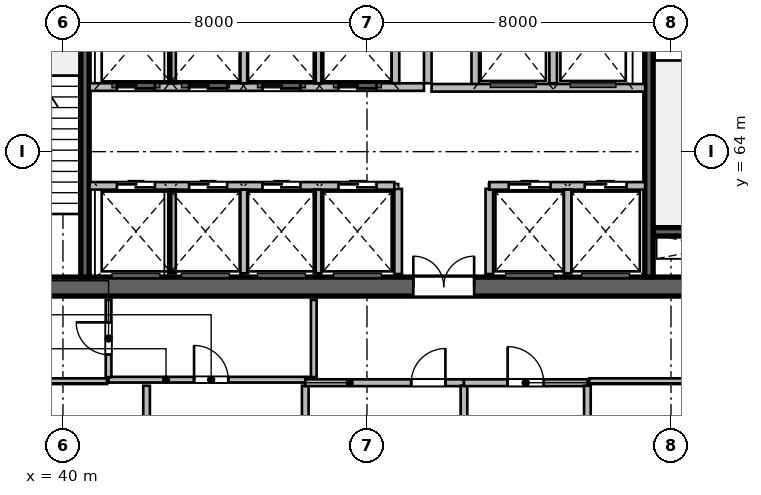
"""IFC4 building model, lengths in metres.
Left out: names, types, materials, properties, quantities, classifications, styles, units other than length and angle.
Written with IfcOpenShell. Run it as: python <this file> out.ifc"""

import sys

from ifc_helpers import new_model, si_unit, direction, frame, frame_2d, origin, place, context, subcontext, project, spatial, rectangle, extrude, source, transform, mapped, element, fill, save


model = new_model("IFC4")
c1 = context("Model", 3, precision=1e-05, world=origin(), true_north=direction((0.0, 1.0)))
c2 = subcontext(c1, "Body", "Model", "MODEL_VIEW")
j1 = project(units=[si_unit("LENGTHUNIT", "METRE"), si_unit("PLANEANGLEUNIT", "RADIAN")], contexts=[c1])
p1 = place(None, origin())
s1 = spatial("IfcSite", under=j1, at=p1, CompositionType="ELEMENT")
p2 = place(p1, origin())
s2 = spatial("IfcBuilding", under=s1, at=p2, CompositionType="ELEMENT")
p3 = place(p2, frame((0.0, 0.0, 91.2)))
s3 = spatial("IfcBuildingStorey", under=s2, at=p3, CompositionType="ELEMENT", Elevation=91.2)
m1 = source(origin(), c2, "Body", "SweptSolid", [
    extrude(rectangle(XDim=21.6, YDim=0.5, at=frame_2d((10.8, 0.0))), origin(), (0.0, 0.0, 1.0), 4.8),
])
p4 = place(p3, frame((37.2, 60.45, 0.0), z_axis=(0.0, 0.0, 1.0), x_axis=(1.0, 0.0, 0.0)))
e1 = element("IfcWall", 1, at=p4, inside=s3, PredefinedType="SHEAR", context=c2, shape_type="MappedRepresentation", body=[
    mapped(m1, transform((0.0, 0.0, 0.0), scale=1.0)),
])
p5 = place(p4, frame((1.1, 0.0, 0.0)))
e2 = element("IfcOpeningElement", 2, at=p5, cuts=e1, PredefinedType="OPENING", context=c2, shape_type="SweptSolid", body=[
    extrude(rectangle(XDim=1.15, YDim=2.15, at=frame_2d((0.575, 1.075))), frame((0.0, 0.26, 0.0), z_axis=(0.0, -1.0, 0.0), x_axis=(1.0, 0.0, 0.0)), (0.0, 0.0, 1.0), 0.52),
])
p6 = place(p4, frame((19.5, 0.0, 0.0)))
e3 = element("IfcOpeningElement", 3, at=p6, cuts=e1, PredefinedType="OPENING", context=c2, shape_type="SweptSolid", body=[
    extrude(rectangle(XDim=0.9, YDim=2.1, at=frame_2d((0.45, 1.05))), frame((0.0, 0.26, 0.0), z_axis=(0.0, -1.0, 0.0), x_axis=(1.0, 0.0, 0.0)), (0.0, 0.0, 1.0), 0.52),
])
p7 = place(p4, frame((12.02, 0.0, 0.0)))
e4 = element("IfcOpeningElement", 4, at=p7, cuts=e1, PredefinedType="OPENING", context=c2, shape_type="SweptSolid", body=[
    extrude(rectangle(XDim=1.6, YDim=2.15, at=frame_2d((0.8, 1.075))), frame((0.0, 0.26, 0.0), z_axis=(0.0, -1.0, 0.0), x_axis=(1.0, 0.0, 0.0)), (0.0, 0.0, 1.0), 0.52),
])
m2 = source(origin(), c2, "Body", "SweptSolid", [
    extrude(rectangle(XDim=3.27, YDim=0.22, at=frame_2d((1.635, 0.0))), origin(), (0.0, 0.0, 1.0), 4.8),
])
p8 = place(p3, frame((55.53, 61.89, 0.0), z_axis=(0.0, 0.0, 1.0), x_axis=(1.0, 0.0, 0.0)))
e5 = element("IfcWall", 5, at=p8, inside=s3, PredefinedType="SHEAR", context=c2, shape_type="MappedRepresentation", body=[
    mapped(m2, transform((0.0, 0.0, 0.0), scale=1.0)),
])
m3 = source(origin(), c2, "Body", "SweptSolid", [
    extrude(rectangle(XDim=11.0, YDim=0.22, at=frame_2d((5.5, 0.0))), origin(), (0.0, 0.0, 1.0), 4.8),
])
p9 = place(p3, frame((40.58, 60.7, 0.0), z_axis=(0.0, 0.0, 1.0), x_axis=(0.0, 1.0, 0.0)))
e6 = element("IfcWall", 6, at=p9, inside=s3, PredefinedType="SHEAR", context=c2, shape_type="MappedRepresentation", body=[
    mapped(m3, transform((0.0, 0.0, 0.0), scale=1.0)),
])
p10 = place(p3, frame((55.42, 60.7, 0.0), z_axis=(0.0, 0.0, 1.0), x_axis=(0.0, 1.0, 0.0)))
e7 = element("IfcWall", 7, at=p10, inside=s3, PredefinedType="SHEAR", context=c2, shape_type="MappedRepresentation", body=[
    mapped(m3, transform((0.0, 0.0, 0.0), scale=1.0)),
])
p11 = place(p10, frame((9.545, 0.0, 0.0)))
e8 = element("IfcOpeningElement", 8, at=p11, cuts=e7, PredefinedType="OPENING", context=c2, shape_type="SweptSolid", body=[
    extrude(rectangle(XDim=1.15, YDim=2.15, at=frame_2d((0.575, 1.075))), frame((0.0, 0.12, 0.0), z_axis=(0.0, -1.0, 0.0), x_axis=(1.0, 0.0, 0.0)), (0.0, 0.0, 1.0), 0.24),
])
m4 = source(origin(), c2, "Body", "SweptSolid", [
    extrude(rectangle(XDim=2.24, YDim=0.2, at=frame_2d((1.12, 0.0))), origin(), (0.0, 0.0, 1.0), 4.55),
])
for number, where, z_axis, x_axis in (
    (9, (48.82, 60.78, 0.0), (0.0, 0.0, 1.0), (0.0, 1.0, 0.0)),
    (10, (51.22, 60.78, 0.0), (0.0, 0.0, 1.0), (0.0, 1.0, 0.0)),
):
    element("IfcWall", number, at=place(p3, frame(where, z_axis=z_axis, x_axis=x_axis)), inside=s3, PredefinedType="SOLIDWALL", context=c2, shape_type="MappedRepresentation", body=[
        mapped(m4, transform((0.0, 0.0, 0.0), scale=1.0)),
    ])
m5 = source(origin(), c2, "Body", "SweptSolid", [
    extrude(rectangle(XDim=5.8, YDim=0.2, at=frame_2d((2.9, 0.0))), origin(), (0.0, 0.0, 1.0), 4.55),
])
p12 = place(p3, frame((49.6, 65.8, 0.0), z_axis=(0.0, 0.0, 1.0), x_axis=(0.0, 1.0, 0.0)))
e11 = element("IfcWall", 11, at=p12, inside=s3, PredefinedType="SOLIDWALL", context=c2, shape_type="MappedRepresentation", body=[
    mapped(m5, transform((0.0, 0.0, 0.0), scale=1.0)),
])
m6 = source(origin(), c2, "Body", "SweptSolid", [
    extrude(rectangle(XDim=2.58, YDim=0.2, at=frame_2d((1.29, 0.0))), origin(), (0.0, 0.0, 1.0), 4.55),
])
p13 = place(p3, frame((50.85, 65.68, 0.0), z_axis=(0.0, 0.0, 1.0), x_axis=(0.0, 1.0, 0.0)))
e12 = element("IfcWall", 12, at=p13, inside=s3, PredefinedType="SOLIDWALL", context=c2, shape_type="MappedRepresentation", body=[
    mapped(m6, transform((0.0, 0.0, 0.0), scale=1.0)),
])
m7 = source(origin(), c2, "Body", "SweptSolid", [
    extrude(rectangle(XDim=2.4, YDim=0.2, at=frame_2d((1.2, 0.0))), origin(), (0.0, 0.0, 1.0), 4.55),
])
p14 = place(p3, frame((52.9, 65.8, 0.0), z_axis=(0.0, 0.0, 1.0), x_axis=(0.0, 1.0, 0.0)))
e13 = element("IfcWall", 13, at=p14, inside=s3, PredefinedType="SOLIDWALL", context=c2, shape_type="MappedRepresentation", body=[
    mapped(m7, transform((0.0, 0.0, 0.0), scale=1.0)),
])
m8 = source(origin(), c2, "Body", "SweptSolid", [
    extrude(rectangle(XDim=5.62, YDim=0.2, at=frame_2d((2.81, 0.0))), origin(), (0.0, 0.0, 1.0), 4.55),
])
p15 = place(p3, frame((49.7, 65.68, 0.0), z_axis=(0.0, 0.0, 1.0), x_axis=(1.0, 0.0, 0.0)))
e14 = element("IfcWall", 14, at=p15, inside=s3, PredefinedType="SOLIDWALL", context=c2, shape_type="MappedRepresentation", body=[
    mapped(m8, transform((0.0, 0.0, 0.0), scale=1.0)),
])
m9 = source(origin(), c2, "Body", "SweptSolid", [
    extrude(rectangle(XDim=8.02, YDim=0.2, at=frame_2d((4.01, 0.0))), origin(), (0.0, 0.0, 1.0), 4.55),
])
p16 = place(p3, frame((40.7, 63.1, 0.0), z_axis=(0.0, 0.0, 1.0), x_axis=(1.0, 0.0, 0.0)))
e15 = element("IfcWall", 15, at=p16, inside=s3, PredefinedType="SOLIDWALL", context=c2, shape_type="MappedRepresentation", body=[
    mapped(m9, transform((0.0, 0.0, 0.0), scale=1.0)),
])
p17 = place(p16, frame((0.72, 0.0, 0.0)))
e16 = element("IfcOpeningElement", 16, at=p17, cuts=e15, PredefinedType="OPENING", context=c2, shape_type="SweptSolid", body=[
    extrude(rectangle(XDim=1.0, YDim=2.15, at=frame_2d((0.5, 1.075))), frame((0.0, 0.11, 0.0), z_axis=(0.0, -1.0, 0.0), x_axis=(1.0, 0.0, 0.0)), (0.0, 0.0, 1.0), 0.22),
])
p18 = place(p16, frame((2.62, 0.0, 0.0)))
e17 = element("IfcOpeningElement", 17, at=p18, cuts=e15, PredefinedType="OPENING", context=c2, shape_type="SweptSolid", body=[
    extrude(rectangle(XDim=1.0, YDim=2.15, at=frame_2d((0.5, 1.075))), frame((0.0, 0.11, 0.0), z_axis=(0.0, -1.0, 0.0), x_axis=(1.0, 0.0, 0.0)), (0.0, 0.0, 1.0), 0.22),
])
p19 = place(p16, frame((4.55, 0.0, 0.0)))
e18 = element("IfcOpeningElement", 18, at=p19, cuts=e15, PredefinedType="OPENING", context=c2, shape_type="SweptSolid", body=[
    extrude(rectangle(XDim=1.0, YDim=2.15, at=frame_2d((0.5, 1.075))), frame((0.0, 0.11, 0.0), z_axis=(0.0, -1.0, 0.0), x_axis=(1.0, 0.0, 0.0)), (0.0, 0.0, 1.0), 0.22),
])
p20 = place(p16, frame((6.55, 0.0, 0.0)))
e19 = element("IfcOpeningElement", 19, at=p20, cuts=e15, PredefinedType="OPENING", context=c2, shape_type="SweptSolid", body=[
    extrude(rectangle(XDim=1.0, YDim=2.15, at=frame_2d((0.5, 1.075))), frame((0.0, 0.11, 0.0), z_axis=(0.0, -1.0, 0.0), x_axis=(1.0, 0.0, 0.0)), (0.0, 0.0, 1.0), 0.22),
])
m10 = source(origin(), c2, "Body", "SweptSolid", [
    extrude(rectangle(XDim=4.1, YDim=0.2, at=frame_2d((2.05, 0.0))), origin(), (0.0, 0.0, 1.0), 4.55),
])
p21 = place(p3, frame((51.22, 63.1, 0.0), z_axis=(0.0, 0.0, 1.0), x_axis=(1.0, 0.0, 0.0)))
e20 = element("IfcWall", 20, at=p21, inside=s3, PredefinedType="SOLIDWALL", context=c2, shape_type="MappedRepresentation", body=[
    mapped(m10, transform((0.0, 0.0, 0.0), scale=1.0)),
])
p22 = place(p21, frame((0.51, 0.0, 0.0)))
e21 = element("IfcOpeningElement", 21, at=p22, cuts=e20, PredefinedType="OPENING", context=c2, shape_type="SweptSolid", body=[
    extrude(rectangle(XDim=1.1, YDim=2.15, at=frame_2d((0.55, 1.075))), frame((0.0, 0.11, 0.0), z_axis=(0.0, -1.0, 0.0), x_axis=(1.0, 0.0, 0.0)), (0.0, 0.0, 1.0), 0.22),
])
p23 = place(p21, frame((2.51, 0.0, 0.0)))
e22 = element("IfcOpeningElement", 22, at=p23, cuts=e20, PredefinedType="OPENING", context=c2, shape_type="SweptSolid", body=[
    extrude(rectangle(XDim=1.1, YDim=2.15, at=frame_2d((0.55, 1.075))), frame((0.0, 0.11, 0.0), z_axis=(0.0, -1.0, 0.0), x_axis=(1.0, 0.0, 0.0)), (0.0, 0.0, 1.0), 0.22),
])
m11 = source(origin(), c2, "Body", "SweptSolid", [
    extrude(rectangle(XDim=2.2, YDim=0.2, at=frame_2d((1.1, 0.0))), origin(), (0.0, 0.0, 1.0), 4.55),
])
for number, where, z_axis, x_axis in (
    (23, (42.87, 60.8, 0.0), (0.0, 0.0, 1.0), (0.0, 1.0, 0.0)),
    (24, (44.77, 60.8, 0.0), (0.0, 0.0, 1.0), (0.0, 1.0, 0.0)),
    (25, (46.7, 60.8, 0.0), (0.0, 0.0, 1.0), (0.0, 1.0, 0.0)),
    (26, (53.28, 60.8, 0.0), (0.0, 0.0, 1.0), (0.0, 1.0, 0.0)),
):
    element("IfcWall", number, at=place(p3, frame(where, z_axis=z_axis, x_axis=x_axis)), inside=s3, PredefinedType="SOLIDWALL", context=c2, shape_type="MappedRepresentation", body=[
        mapped(m11, transform((0.0, 0.0, 0.0), scale=1.0)),
    ])
m12 = source(origin(), c2, "Body", "SweptSolid", [
    extrude(rectangle(XDim=8.8, YDim=0.2, at=frame_2d((4.4, 0.0))), origin(), (0.0, 0.0, 1.0), 4.55),
])
p24 = place(p3, frame((40.7, 65.7, 0.0), z_axis=(0.0, 0.0, 1.0), x_axis=(1.0, 0.0, 0.0)))
e27 = element("IfcWall", 27, at=p24, inside=s3, PredefinedType="SOLIDWALL", context=c2, shape_type="MappedRepresentation", body=[
    mapped(m12, transform((0.0, 0.0, 0.0), scale=1.0)),
])
p25 = place(p24, frame((0.72, 0.0, 0.0)))
e28 = element("IfcOpeningElement", 28, at=p25, cuts=e27, PredefinedType="OPENING", context=c2, shape_type="SweptSolid", body=[
    extrude(rectangle(XDim=1.0, YDim=2.15, at=frame_2d((0.5, 1.075))), frame((0.0, 0.11, 0.0), z_axis=(0.0, -1.0, 0.0), x_axis=(1.0, 0.0, 0.0)), (0.0, 0.0, 1.0), 0.22),
])
p26 = place(p24, frame((2.62, 0.0, 0.0)))
e29 = element("IfcOpeningElement", 29, at=p26, cuts=e27, PredefinedType="OPENING", context=c2, shape_type="SweptSolid", body=[
    extrude(rectangle(XDim=1.0, YDim=2.15, at=frame_2d((0.5, 1.075))), frame((0.0, 0.11, 0.0), z_axis=(0.0, -1.0, 0.0), x_axis=(1.0, 0.0, 0.0)), (0.0, 0.0, 1.0), 0.22),
])
p27 = place(p24, frame((4.55, 0.0, 0.0)))
e30 = element("IfcOpeningElement", 30, at=p27, cuts=e27, PredefinedType="OPENING", context=c2, shape_type="SweptSolid", body=[
    extrude(rectangle(XDim=1.0, YDim=2.15, at=frame_2d((0.5, 1.075))), frame((0.0, 0.11, 0.0), z_axis=(0.0, -1.0, 0.0), x_axis=(1.0, 0.0, 0.0)), (0.0, 0.0, 1.0), 0.22),
])
p28 = place(p24, frame((6.55, 0.0, 0.0)))
e31 = element("IfcOpeningElement", 31, at=p28, cuts=e27, PredefinedType="OPENING", context=c2, shape_type="SweptSolid", body=[
    extrude(rectangle(XDim=1.0, YDim=2.15, at=frame_2d((0.5, 1.075))), frame((0.0, 0.11, 0.0), z_axis=(0.0, -1.0, 0.0), x_axis=(1.0, 0.0, 0.0)), (0.0, 0.0, 1.0), 0.22),
])
for number, where, z_axis, x_axis in (
    (32, (48.75, 65.8, 0.0), (0.0, 0.0, 1.0), (0.0, 1.0, 0.0)),
    (33, (42.87, 65.8, 0.0), (0.0, 0.0, 1.0), (0.0, 1.0, 0.0)),
    (34, (44.77, 65.8, 0.0), (0.0, 0.0, 1.0), (0.0, 1.0, 0.0)),
    (35, (46.7, 65.8, 0.0), (0.0, 0.0, 1.0), (0.0, 1.0, 0.0)),
):
    element("IfcWall", number, at=place(p3, frame(where, z_axis=z_axis, x_axis=x_axis)), inside=s3, PredefinedType="SOLIDWALL", context=c2, shape_type="MappedRepresentation", body=[
        mapped(m7, transform((0.0, 0.0, 0.0), scale=1.0)),
    ])
m13 = source(origin(), c2, "Body", "SweptSolid", [
    extrude(rectangle(XDim=5.4, YDim=0.15, at=frame_2d((2.7, 0.0))), origin(), (0.0, 0.0, 1.0), 4.117),
])
p29 = place(p3, frame((41.2, 58.0, 0.0), z_axis=(0.0, 0.0, 1.0), x_axis=(1.0, 0.0, 0.0)))
e36 = element("IfcWall", 36, at=p29, inside=s3, PredefinedType="PARTITIONING", context=c2, shape_type="MappedRepresentation", body=[
    mapped(m13, transform((0.0, 0.0, 0.0), scale=1.0)),
])
p30 = place(p29, frame((2.25, 0.0, 0.0)))
e37 = element("IfcOpeningElement", 37, at=p30, cuts=e36, PredefinedType="OPENING", context=c2, shape_type="SweptSolid", body=[
    extrude(rectangle(XDim=0.9, YDim=2.08, at=frame_2d((0.45, 1.04))), frame((0.0, 0.085, 0.0), z_axis=(0.0, -1.0, 0.0), x_axis=(1.0, 0.0, 0.0)), (0.0, 0.0, 1.0), 0.17),
])
m14 = source(origin(), c2, "Body", "SweptSolid", [
    extrude(rectangle(XDim=2.033, YDim=0.15, at=frame_2d((1.016, 0.0))), origin(), (0.0, 0.0, 1.0), 4.55),
])
p31 = place(p3, frame((41.2, 58.067, 0.0), z_axis=(0.0, 0.0, 1.0), x_axis=(0.0, 1.0, 0.0)))
e38 = element("IfcWall", 38, at=p31, inside=s3, PredefinedType="PARTITIONING", context=c2, shape_type="MappedRepresentation", body=[
    mapped(m14, transform((0.0, 0.0, 0.0), scale=1.0)),
])
p32 = place(p31, frame((0.591, 0.0, 0.0)))
e39 = element("IfcOpeningElement", 39, at=p32, cuts=e38, PredefinedType="OPENING", context=c2, shape_type="SweptSolid", body=[
    extrude(rectangle(XDim=0.85, YDim=2.1, at=frame_2d((0.425, 1.05))), frame((0.0, 0.085, 0.0), z_axis=(0.0, -1.0, 0.0), x_axis=(1.0, 0.0, 0.0)), (0.0, 0.0, 1.0), 0.17),
])
p33 = place(p3, frame((46.6, 58.067, 0.0), z_axis=(0.0, 0.0, 1.0), x_axis=(0.0, 1.0, 0.0)))
e40 = element("IfcWall", 40, at=p33, inside=s3, PredefinedType="PARTITIONING", context=c2, shape_type="MappedRepresentation", body=[
    mapped(m14, transform((0.0, 0.0, 0.0), scale=1.0)),
])
m15 = source(origin(), c2, "Body", "SweptSolid", [
    extrude(rectangle(XDim=3.763, YDim=0.175, at=frame_2d((1.881, 0.0))), origin(), (0.0, 0.0, 1.0), 4.55),
])
for number, where, z_axis, x_axis in (
    (41, (42.2, 54.079, 0.0), (0.0, 0.0, 1.0), (0.0, 1.0, 0.0)),
    (42, (46.376, 54.079, 0.0), (0.0, 0.0, 1.0), (0.0, 1.0, 0.0)),
):
    element("IfcWall", number, at=place(p3, frame(where, z_axis=z_axis, x_axis=x_axis)), inside=s3, PredefinedType="PARTITIONING", context=c2, shape_type="MappedRepresentation", body=[
        mapped(m15, transform((0.0, 0.0, 0.0), scale=1.0)),
    ])
m16 = source(origin(), c2, "Body", "SweptSolid", [
    extrude(rectangle(XDim=4.176, YDim=0.18, at=frame_2d((2.088, 0.0))), origin(), (0.0, 0.0, 1.0), 4.55),
])
p34 = place(p3, frame((46.376, 57.92, 0.0), z_axis=(0.0, 0.0, 1.0), x_axis=(1.0, 0.0, 0.0)))
e43 = element("IfcWall", 43, at=p34, inside=s3, PredefinedType="PLUMBINGWALL", context=c2, shape_type="MappedRepresentation", body=[
    mapped(m16, transform((0.0, 0.0, 0.0), scale=1.0)),
])
p35 = place(p34, frame((2.788, 0.0, 0.0)))
e44 = element("IfcOpeningElement", 44, at=p35, cuts=e43, PredefinedType="OPENING", context=c2, shape_type="SweptSolid", body=[
    extrude(rectangle(XDim=0.9, YDim=2.08, at=frame_2d((0.45, 1.04))), frame((0.0, 0.1, 0.0), z_axis=(0.0, -1.0, 0.0), x_axis=(1.0, 0.0, 0.0)), (0.0, 0.0, 1.0), 0.2),
])
p36 = place(p3, frame((50.552, 54.079, 0.0), z_axis=(0.0, 0.0, 1.0), x_axis=(0.0, 1.0, 0.0)))
e45 = element("IfcWall", 45, at=p36, inside=s3, PredefinedType="PARTITIONING", context=c2, shape_type="MappedRepresentation", body=[
    mapped(m15, transform((0.0, 0.0, 0.0), scale=1.0)),
])
m17 = source(origin(), c2, "Body", "SweptSolid", [
    extrude(rectangle(XDim=3.248, YDim=0.18, at=frame_2d((1.624, 0.0))), origin(), (0.0, 0.0, 1.0), 4.55),
])
p37 = place(p3, frame((50.552, 57.92, 0.0), z_axis=(0.0, 0.0, 1.0), x_axis=(1.0, 0.0, 0.0)))
e46 = element("IfcWall", 46, at=p37, inside=s3, PredefinedType="PLUMBINGWALL", context=c2, shape_type="MappedRepresentation", body=[
    mapped(m17, transform((0.0, 0.0, 0.0), scale=1.0)),
])
p38 = place(p37, frame((1.149, 0.0, 0.0)))
e47 = element("IfcOpeningElement", 47, at=p38, cuts=e46, PredefinedType="OPENING", context=c2, shape_type="SweptSolid", body=[
    extrude(rectangle(XDim=0.95, YDim=2.12, at=frame_2d((0.475, 1.06))), frame((0.0, 0.1, 0.0), z_axis=(0.0, -1.0, 0.0), x_axis=(1.0, 0.0, 0.0)), (0.0, 0.0, 1.0), 0.2),
])
p39 = place(p3, frame((53.8, 54.079, 0.0), z_axis=(0.0, 0.0, 1.0), x_axis=(0.0, 1.0, 0.0)))
e48 = element("IfcWall", 48, at=p39, inside=s3, PredefinedType="PARTITIONING", context=c2, shape_type="MappedRepresentation", body=[
    mapped(m15, transform((0.0, 0.0, 0.0), scale=1.0)),
])
m18 = source(origin(), c2, "Body", "SweptSolid", [
    extrude(rectangle(XDim=6.8, YDim=0.15, at=frame_2d((3.4, 0.0))), origin(), (0.0, 0.0, 1.0), 4.55),
])
p40 = place(p3, frame((34.36, 57.96, 0.0), z_axis=(0.0, 0.0, 1.0), x_axis=(1.0, 0.0, 0.0)))
e49 = element("IfcWall", 49, at=p40, inside=s3, PredefinedType="PARTITIONING", context=c2, shape_type="MappedRepresentation", body=[
    mapped(m18, transform((0.0, 0.0, 0.0), scale=1.0)),
])
m19 = source(origin(), c2, "Body", "SweptSolid", [
    extrude(rectangle(XDim=7.79, YDim=0.15, at=frame_2d((3.895, 0.0))), origin(), (0.0, 0.0, 1.0), 4.117),
])
p41 = place(p3, frame((53.85, 57.96, 0.0), z_axis=(0.0, 0.0, 1.0), x_axis=(1.0, 0.0, 0.0)))
e50 = element("IfcWall", 50, at=p41, inside=s3, PredefinedType="PARTITIONING", context=c2, shape_type="MappedRepresentation", body=[
    mapped(m19, transform((0.0, 0.0, 0.0), scale=1.0)),
])
p42 = place(p41, frame((3.195, 0.0, 0.0)))
e51 = element("IfcOpeningElement", 51, at=p42, cuts=e50, PredefinedType="OPENING", context=c2, shape_type="SweptSolid", body=[
    extrude(rectangle(XDim=1.4, YDim=2.15, at=frame_2d((0.7, 1.075))), frame((0.0, 0.085, 0.0), z_axis=(0.0, -1.0, 0.0), x_axis=(1.0, 0.0, 0.0)), (0.0, 0.0, 1.0), 0.17),
])
m20 = source(origin(), c2, "Body", "SweptSolid", [
    extrude(rectangle(XDim=1.6, YDim=2.15, at=frame_2d((0.8, 1.075))), frame((0.0, 0.025, 0.0), z_axis=(0.0, -1.0, 0.0), x_axis=(1.0, 0.0, 0.0)), (0.0, 0.0, 1.0), 0.05),
])
p43 = place(p7, origin())
e52 = element("IfcDoor", 52, at=p43, inside=s3, OperationType="DOUBLE_DOOR_SINGLE_SWING", PredefinedType="DOOR", context=c2, shape_type="MappedRepresentation", body=[
    mapped(m20, transform((0.0, 0.0, 0.0), scale=1.0)),
])
fill(e4, e52)
m21 = source(origin(), c2, "Body", "SweptSolid", [
    extrude(rectangle(XDim=1.0, YDim=2.15, at=frame_2d((0.5, 1.075))), frame((0.0, 0.025, 0.0), z_axis=(0.0, -1.0, 0.0), x_axis=(1.0, 0.0, 0.0)), (0.0, 0.0, 1.0), 0.05),
])
p44 = place(p17, origin())
e53 = element("IfcDoor", 53, at=p44, inside=s3, OperationType="DOUBLE_DOOR_SLIDING", PredefinedType="DOOR", context=c2, shape_type="MappedRepresentation", body=[
    mapped(m21, transform((0.0, 0.0, 0.0), scale=1.0)),
])
fill(e16, e53)
p45 = place(p18, origin())
e54 = element("IfcDoor", 54, at=p45, inside=s3, OperationType="DOUBLE_DOOR_SLIDING", PredefinedType="DOOR", context=c2, shape_type="MappedRepresentation", body=[
    mapped(m21, transform((0.0, 0.0, 0.0), scale=1.0)),
])
fill(e17, e54)
p46 = place(p19, origin())
e55 = element("IfcDoor", 55, at=p46, inside=s3, OperationType="DOUBLE_DOOR_SLIDING", PredefinedType="DOOR", context=c2, shape_type="MappedRepresentation", body=[
    mapped(m21, transform((0.0, 0.0, 0.0), scale=1.0)),
])
fill(e18, e55)
p47 = place(p20, origin())
e56 = element("IfcDoor", 56, at=p47, inside=s3, OperationType="DOUBLE_DOOR_SLIDING", PredefinedType="DOOR", context=c2, shape_type="MappedRepresentation", body=[
    mapped(m21, transform((0.0, 0.0, 0.0), scale=1.0)),
])
fill(e19, e56)
m22 = source(origin(), c2, "Body", "SweptSolid", [
    extrude(rectangle(XDim=1.1, YDim=2.15, at=frame_2d((0.55, 1.075))), frame((0.0, 0.025, 0.0), z_axis=(0.0, -1.0, 0.0), x_axis=(1.0, 0.0, 0.0)), (0.0, 0.0, 1.0), 0.05),
])
p48 = place(p22, origin())
e57 = element("IfcDoor", 57, at=p48, inside=s3, OperationType="DOUBLE_DOOR_SLIDING", PredefinedType="DOOR", context=c2, shape_type="MappedRepresentation", body=[
    mapped(m22, transform((0.0, 0.0, 0.0), scale=1.0)),
])
fill(e21, e57)
p49 = place(p23, origin())
e58 = element("IfcDoor", 58, at=p49, inside=s3, OperationType="DOUBLE_DOOR_SLIDING", PredefinedType="DOOR", context=c2, shape_type="MappedRepresentation", body=[
    mapped(m22, transform((0.0, 0.0, 0.0), scale=1.0)),
])
fill(e22, e58)
p50 = place(p25, origin())
e59 = element("IfcDoor", 59, at=p50, inside=s3, OperationType="DOUBLE_DOOR_SLIDING", PredefinedType="DOOR", context=c2, shape_type="MappedRepresentation", body=[
    mapped(m21, transform((0.0, 0.0, 0.0), scale=1.0)),
])
fill(e28, e59)
p51 = place(p26, origin())
e60 = element("IfcDoor", 60, at=p51, inside=s3, OperationType="DOUBLE_DOOR_SLIDING", PredefinedType="DOOR", context=c2, shape_type="MappedRepresentation", body=[
    mapped(m21, transform((0.0, 0.0, 0.0), scale=1.0)),
])
fill(e29, e60)
p52 = place(p27, origin())
e61 = element("IfcDoor", 61, at=p52, inside=s3, OperationType="DOUBLE_DOOR_SLIDING", PredefinedType="DOOR", context=c2, shape_type="MappedRepresentation", body=[
    mapped(m21, transform((0.0, 0.0, 0.0), scale=1.0)),
])
fill(e30, e61)
p53 = place(p28, origin())
e62 = element("IfcDoor", 62, at=p53, inside=s3, OperationType="DOUBLE_DOOR_SLIDING", PredefinedType="DOOR", context=c2, shape_type="MappedRepresentation", body=[
    mapped(m21, transform((0.0, 0.0, 0.0), scale=1.0)),
])
fill(e31, e62)
m23 = source(origin(), c2, "Body", "SweptSolid", [
    extrude(rectangle(XDim=0.85, YDim=2.1, at=frame_2d((0.425, 1.05))), frame((0.0, 0.025, 0.0), z_axis=(0.0, -1.0, 0.0), x_axis=(1.0, 0.0, 0.0)), (0.0, 0.0, 1.0), 0.05),
])
p54 = place(p32, origin())
e63 = element("IfcDoor", 63, at=p54, inside=s3, OperationType="SINGLE_SWING_RIGHT", PredefinedType="DOOR", context=c2, shape_type="MappedRepresentation", body=[
    mapped(m23, transform((0.0, 0.0, 0.0), scale=1.0)),
])
fill(e39, e63)
m24 = source(origin(), c2, "Body", "SweptSolid", [
    extrude(rectangle(XDim=0.9, YDim=2.08, at=frame_2d((0.45, 1.04))), frame((0.0, 0.025, 0.0), z_axis=(0.0, -1.0, 0.0), x_axis=(1.0, 0.0, 0.0)), (0.0, 0.0, 1.0), 0.05),
])
p55 = place(p30, origin())
e64 = element("IfcDoor", 64, at=p55, inside=s3, OperationType="SINGLE_SWING_LEFT", PredefinedType="DOOR", context=c2, shape_type="MappedRepresentation", body=[
    mapped(m24, transform((0.0, 0.0, 0.0), scale=1.0)),
])
fill(e37, e64)
p56 = place(p35, origin())
e65 = element("IfcDoor", 65, at=p56, inside=s3, OperationType="SINGLE_SWING_RIGHT", PredefinedType="DOOR", context=c2, shape_type="MappedRepresentation", body=[
    mapped(m24, transform((0.0, 0.0, 0.0), scale=1.0)),
])
fill(e44, e65)
m25 = source(origin(), c2, "Body", "SweptSolid", [
    extrude(rectangle(XDim=0.95, YDim=2.12, at=frame_2d((0.475, 1.06))), frame((0.0, 0.025, 0.0), z_axis=(0.0, -1.0, 0.0), x_axis=(1.0, 0.0, 0.0)), (0.0, 0.0, 1.0), 0.05),
])
p57 = place(p38, origin())
e66 = element("IfcDoor", 66, at=p57, inside=s3, OperationType="SINGLE_SWING_LEFT", PredefinedType="DOOR", context=c2, shape_type="MappedRepresentation", body=[
    mapped(m25, transform((0.0, 0.0, 0.0), scale=1.0)),
])
fill(e47, e66)
save(model, sys.argv[1])
